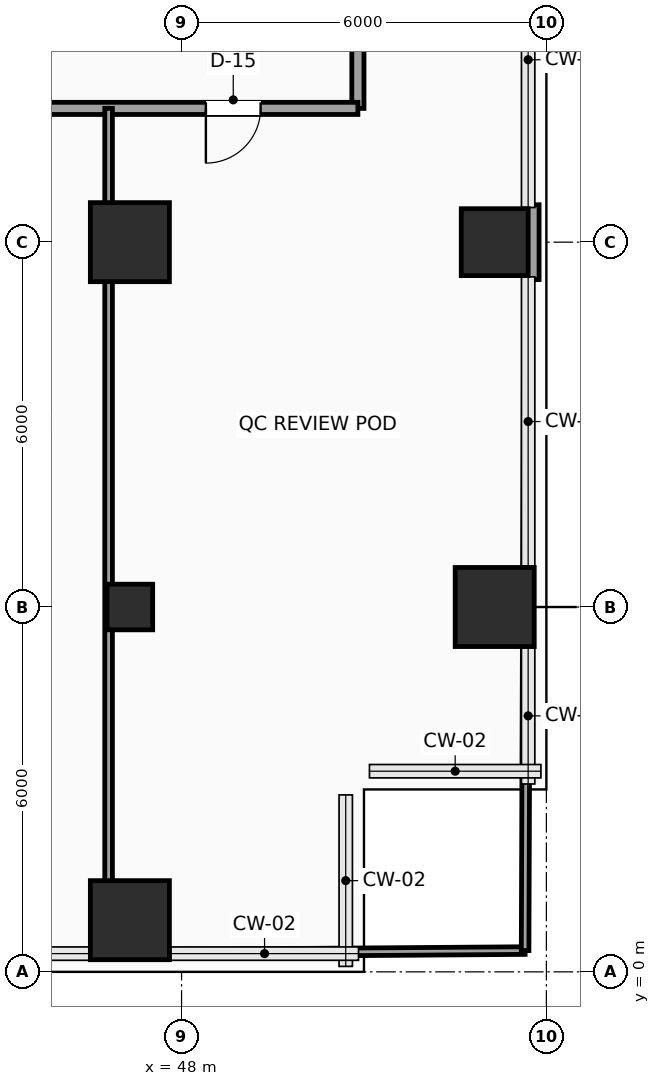
"""IFC4 building model, lengths in metres.
Left out: names, types, materials, properties, quantities, classifications, styles, units other than length and angle.
Written with IfcOpenShell. Run it as: python <this file> out.ifc"""

import sys

from ifc_helpers import new_model, si_unit, direction, frame, frame_2d, origin, origin_2d, place, context, subcontext, project, spatial, rectangle, hollow_rectangle, extrude, element, fill, save


model = new_model("IFC4")
c1 = context("Model", 3, precision=1e-05, world=origin(), true_north=direction((0.0, 1.0)))
c2 = subcontext(c1, "Body", "Model", "MODEL_VIEW")
j1 = project(units=[si_unit("LENGTHUNIT", "METRE"), si_unit("PLANEANGLEUNIT", "RADIAN")], contexts=[c1])
p1 = place(None, origin())
s1 = spatial("IfcSite", under=j1, at=p1, CompositionType="ELEMENT")
p2 = place(p1, origin())
s2 = spatial("IfcBuilding", under=s1, at=p2, CompositionType="ELEMENT")
p3 = place(p2, frame((0.0, 0.0, 48.0)))
s3 = spatial("IfcBuildingStorey", under=s2, at=p3, CompositionType="ELEMENT", Elevation=48.0)
p4 = place(p3, frame((47.15, 0.85, 0.0), z_axis=(0.0, 0.0, 1.0), x_axis=(1.0, 0.0, 0.0)))
e1 = element("IfcColumn", 1, at=p4, inside=s3, PredefinedType="COLUMN", context=c2, shape_type="SweptSolid", body=[
    extrude(rectangle(XDim=1.3, YDim=1.3, at=origin_2d()), origin(), (0.0, 0.0, 1.0), 3.9),
])
p5 = place(p3, frame((47.15, 6.0, 0.0), z_axis=(0.0, 0.0, 1.0), x_axis=(1.0, 0.0, 0.0)))
e2 = element("IfcColumn", 2, at=p5, inside=s3, PredefinedType="COLUMN", context=c2, shape_type="SweptSolid", body=[
    extrude(hollow_rectangle(XDim=0.75, YDim=0.75, WallThickness=0.035, InnerFilletRadius=0.035, OuterFilletRadius=0.05, at=origin_2d()), origin(), (0.0, 0.0, 1.0), 3.9),
])
for number, where, z_axis, x_axis in (
    (3, (47.15, 12.0, 0.0), (0.0, 0.0, 1.0), (1.0, 0.0, 0.0)),
    (4, (53.15, 6.0, 0.0), (0.0, 0.0, 1.0), (1.0, 0.0, 0.0)),
):
    element("IfcColumn", number, at=place(p3, frame(where, z_axis=z_axis, x_axis=x_axis)), inside=s3, PredefinedType="COLUMN", context=c2, shape_type="SweptSolid", body=[
        extrude(rectangle(XDim=1.3, YDim=1.3, at=origin_2d()), origin(), (0.0, 0.0, 1.0), 3.9),
    ])
p6 = place(p3, frame((53.15, 12.0, 0.0), z_axis=(0.0, 0.0, 1.0), x_axis=(1.0, 0.0, 0.0)))
e5 = element("IfcColumn", 5, at=p6, inside=s3, PredefinedType="COLUMN", context=c2, shape_type="SweptSolid", body=[
    extrude(rectangle(XDim=1.1, YDim=1.1, at=origin_2d()), origin(), (0.0, 0.0, 1.0), 3.9),
])
p7 = place(p3, frame((53.76, 12.615, 0.0), z_axis=(0.0, 0.0, 1.0), x_axis=(0.0, -1.0, 0.0)))
e6 = element("IfcWall", 6, at=p7, inside=s3, PredefinedType="SOLIDWALL", context=c2, shape_type="SweptSolid", body=[
    extrude(rectangle(XDim=1.23, YDim=0.24, at=frame_2d((0.615, 0.0))), origin(), (0.0, 0.0, 1.0), 3.65),
])
p8 = place(p3, frame((50.9, 16.55, 0.0), z_axis=(0.0, 0.0, 1.0), x_axis=(0.0, -1.0, 0.0)))
e7 = element("IfcWall", 7, at=p8, inside=s3, PredefinedType="PARTITIONING", context=c2, shape_type="SweptSolid", body=[
    extrude(rectangle(XDim=2.35, YDim=0.2, at=frame_2d((1.175, 0.0))), origin(), (0.0, 0.0, 1.0), 3.65),
])
p9 = place(p3, frame((50.9, 14.2, 0.0), z_axis=(0.0, 0.0, 1.0), x_axis=(-1.0, 0.0, 0.0)))
e8 = element("IfcWall", 8, at=p9, inside=s3, PredefinedType="PARTITIONING", context=c2, shape_type="SweptSolid", body=[
    extrude(rectangle(XDim=12.35, YDim=0.2, at=frame_2d((6.175, 0.0))), origin(), (0.0, 0.0, 1.0), 3.65),
])
p10 = place(p9, frame((9.875, 0.0, 0.0)))
e9 = element("IfcOpeningElement", 9, at=p10, cuts=e8, PredefinedType="OPENING", context=c2, shape_type="SweptSolid", body=[
    extrude(rectangle(XDim=0.9, YDim=2.1, at=frame_2d((0.45, 1.05))), frame((0.0, 0.11, 0.0), z_axis=(0.0, -1.0, 0.0), x_axis=(1.0, 0.0, 0.0)), (0.0, 0.0, 1.0), 0.22),
])
p11 = place(p9, frame((5.75, 0.0, 0.0)))
e10 = element("IfcOpeningElement", 10, at=p11, cuts=e8, PredefinedType="OPENING", context=c2, shape_type="SweptSolid", body=[
    extrude(rectangle(XDim=0.9, YDim=2.1, at=frame_2d((0.45, 1.05))), frame((0.0, 0.11, 0.0), z_axis=(0.0, -1.0, 0.0), x_axis=(1.0, 0.0, 0.0)), (0.0, 0.0, 1.0), 0.22),
])
p12 = place(p9, frame((1.6, 0.0, 0.0)))
e11 = element("IfcOpeningElement", 11, at=p12, cuts=e8, PredefinedType="OPENING", context=c2, shape_type="SweptSolid", body=[
    extrude(rectangle(XDim=0.9, YDim=2.1, at=frame_2d((0.45, 1.05))), frame((0.0, 0.11, 0.0), z_axis=(0.0, -1.0, 0.0), x_axis=(1.0, 0.0, 0.0)), (0.0, 0.0, 1.0), 0.22),
])
p13 = place(p3, frame((46.8, 0.3, 0.0), z_axis=(0.0, 0.0, 1.0), x_axis=(0.0, 1.0, 0.0)))
e12 = element("IfcWall", 12, at=p13, inside=s3, PredefinedType="PARTITIONING", context=c2, shape_type="SweptSolid", body=[
    extrude(rectangle(XDim=13.9, YDim=0.125, at=frame_2d((6.95, 0.0))), origin(), (0.0, 0.0, 1.0), 3.65),
])
p14 = place(p3, frame((46.8, 0.3, 0.0), z_axis=(0.0, 0.0, 1.0), x_axis=(0.999973308199, 0.007306359489, 0.0)))
e13 = element("IfcWall", 13, at=p14, inside=s3, PredefinedType="PARTITIONING", context=c2, shape_type="SweptSolid", body=[
    extrude(rectangle(XDim=6.85, YDim=0.125, at=frame_2d((3.425, 0.0))), origin(), (0.0, 0.0, 1.0), 3.65),
])
p15 = place(p3, frame((53.65, 0.35, 0.0), z_axis=(0.0, 0.0, 1.0), x_axis=(0.003606251025, 0.999993497456, 0.0)))
e14 = element("IfcWall", 14, at=p15, inside=s3, PredefinedType="PARTITIONING", context=c2, shape_type="SweptSolid", body=[
    extrude(rectangle(XDim=11.035, YDim=0.125, at=frame_2d((5.518, 0.0))), origin(), (0.0, 0.0, 1.0), 3.65),
])
p16 = place(p3, frame((53.694, 12.615, 0.0), z_axis=(0.0, 0.0, 1.0), x_axis=(0.003542799701, 0.999993724265, 0.0)))
e15 = element("IfcWall", 15, at=p16, inside=s3, PredefinedType="PARTITIONING", context=c2, shape_type="SweptSolid", body=[
    extrude(rectangle(XDim=1.585, YDim=0.125, at=frame_2d((0.792, 0.0))), origin(), (0.0, 0.0, 1.0), 3.65),
])
p17 = place(p12, origin())
e16 = element("IfcDoor", 16, at=p17, inside=s3, OperationType="SINGLE_SWING_RIGHT", PredefinedType="DOOR", context=c2, shape_type="SweptSolid", body=[
    extrude(rectangle(XDim=0.9, YDim=2.1, at=frame_2d((0.45, 1.05))), frame((0.0, 0.025, 0.0), z_axis=(0.0, -1.0, 0.0), x_axis=(1.0, 0.0, 0.0)), (0.0, 0.0, 1.0), 0.05),
])
fill(e11, e16)
save(model, sys.argv[1])
